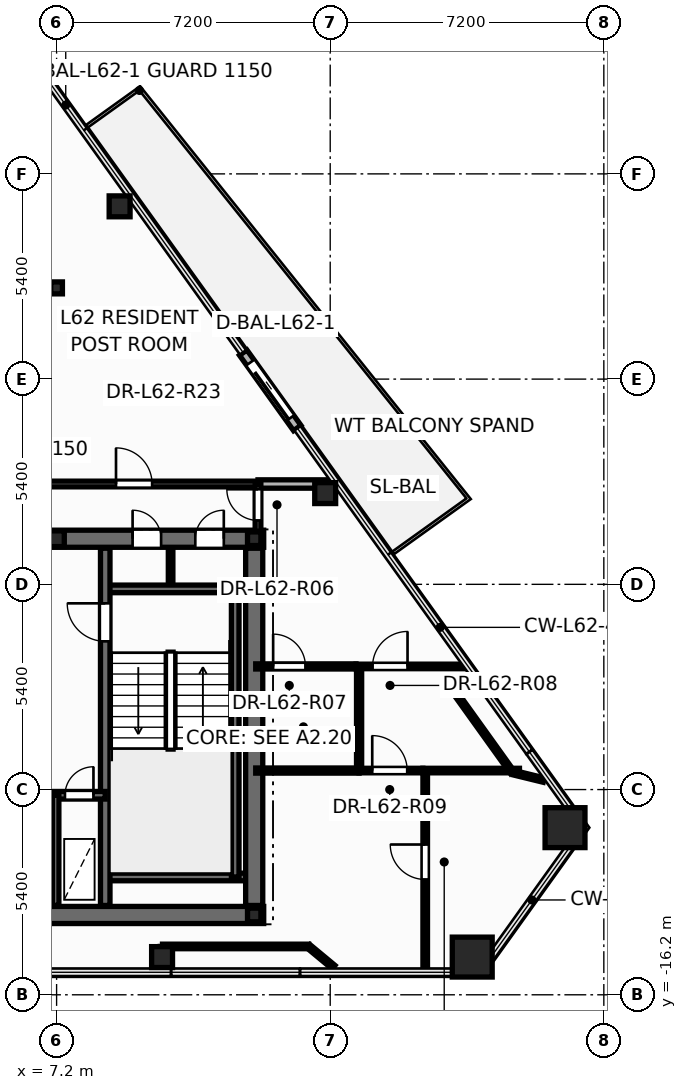
"""IFC4 building model, lengths in metres.
Left out: names, types, materials, properties, quantities, classifications, styles, units other than length and angle.
Written with IfcOpenShell. Run it as: python <this file> out.ifc"""

import sys

from ifc_helpers import new_model, si_unit, direction, frame, frame_2d, origin, origin_2d, place, context, subcontext, project, spatial, rectangle, hollow_rectangle, hollow_circle, i_section, extrude, element, fill, save


model = new_model("IFC4")
c1 = context("Model", 3, precision=1e-05, world=origin(), true_north=direction((0.0, 1.0)))
c2 = subcontext(c1, "Body", "Model", "MODEL_VIEW")
j1 = project(units=[si_unit("LENGTHUNIT", "METRE"), si_unit("PLANEANGLEUNIT", "RADIAN")], contexts=[c1])
p1 = place(None, origin())
s1 = spatial("IfcSite", under=j1, at=p1, CompositionType="ELEMENT")
p2 = place(p1, origin())
s2 = spatial("IfcBuilding", under=s1, at=p2, CompositionType="ELEMENT")
p3 = place(p2, frame((0.0, 0.0, 237.0)))
s3 = spatial("IfcBuildingStorey", under=s2, at=p3, CompositionType="ELEMENT", Elevation=237.0)
for number, where, z_axis, x_axis in (
    (1, (18.137, -15.208, 0.0), (0.0, 0.0, 1.0), (1.0, 0.0, 0.0)),
    (2, (20.579, -11.802, 0.0), (0.0, 0.0, 1.0), (1.0, 0.0, 0.0)),
):
    element("IfcColumn", number, at=place(p3, frame(where, z_axis=z_axis, x_axis=x_axis)), inside=s3, PredefinedType="COLUMN", context=c2, shape_type="SweptSolid", body=[
        extrude(hollow_rectangle(XDim=1.05, YDim=1.05, WallThickness=0.045, at=origin_2d()), origin(), (0.0, 0.0, 1.0), 3.6),
    ])
for number, where, z_axis, x_axis in (
    (3, (9.976, -15.208, 0.0), (0.0, 0.0, 1.0), (1.0, 0.0, 0.0)),
    (4, (14.268, -2.999, 0.0), (0.0, 0.0, 1.0), (1.0, 0.0, 0.0)),
    (5, (8.858, 4.546, 0.0), (0.0, 0.0, 1.0), (1.0, 0.0, 0.0)),
):
    element("IfcColumn", number, at=place(p3, frame(where, z_axis=z_axis, x_axis=x_axis)), inside=s3, PredefinedType="COLUMN", context=c2, shape_type="SweptSolid", body=[
        extrude(hollow_circle(Radius=0.275, WallThickness=0.024, at=origin_2d()), origin(), (0.0, 0.0, 1.0), 3.6),
    ])
for number, where, z_axis, x_axis in (
    (6, (12.4, -14.1, 0.0), (0.0, 0.0, 1.0), (1.0, 0.0, 0.0)),
    (7, (12.4, -4.2, 0.0), (0.0, 0.0, 1.0), (1.0, 0.0, 0.0)),
):
    element("IfcColumn", number, at=place(p3, frame(where, z_axis=z_axis, x_axis=x_axis)), inside=s3, PredefinedType="COLUMN", context=c2, shape_type="SweptSolid", body=[
        extrude(i_section(OverallWidth=0.352, OverallDepth=0.359, WebThickness=0.018, FlangeThickness=0.026, at=origin_2d()), origin(), (0.0, 0.0, 1.0), 3.6),
    ])
p4 = place(p3, frame((7.2, -4.2, 0.0), z_axis=(0.0, 0.0, 1.0), x_axis=(1.0, 0.0, 0.0)))
e8 = element("IfcColumn", 8, at=p4, inside=s3, PredefinedType="PILASTER", context=c2, shape_type="SweptSolid", body=[
    extrude(i_section(OverallWidth=0.405, OverallDepth=0.414, WebThickness=0.022, FlangeThickness=0.032, at=origin_2d()), origin(), (0.0, 0.0, 1.0), 3.6),
])
p5 = place(p3, frame((7.2, 2.4, 0.0), z_axis=(0.0, 0.0, 1.0), x_axis=(1.0, 0.0, 0.0)))
e9 = element("IfcColumn", 9, at=p5, inside=s3, PredefinedType="COLUMN", context=c2, shape_type="SweptSolid", body=[
    extrude(i_section(OverallWidth=0.307, OverallDepth=0.314, WebThickness=0.012, FlangeThickness=0.019, at=origin_2d()), origin(), (0.0, 0.0, 1.0), 3.6),
])
p6 = place(p3, frame((13.532, -1.287, -0.015), z_axis=(0.0, 0.0, 1.0), x_axis=(-0.582666574714, 0.812711303423, 0.0)))
e10 = element("IfcWall", 10, at=p6, inside=s3, PredefinedType="STANDARD", context=c2, shape_type="SweptSolid", body=[
    extrude(rectangle(XDim=2.44, YDim=0.24, at=frame_2d((1.22, 0.0))), origin(), (0.0, 0.0, 1.0), 2.878),
])
p7 = place(p6, frame((0.32, 0.0, 0.015)))
e11 = element("IfcOpeningElement", 11, at=p7, cuts=e10, PredefinedType="OPENING", context=c2, shape_type="SweptSolid", body=[
    extrude(rectangle(XDim=1.806, YDim=2.204, at=frame_2d((0.9, 1.102))), frame((0.0, 0.13, 0.0), z_axis=(0.0, -1.0, 0.0), x_axis=(1.0, 0.0, 0.0)), (0.0, 0.0, 1.0), 0.26),
])
p8 = place(p3, frame((10.2, -5.52, 0.0), z_axis=(0.0, 0.0, 1.0), x_axis=(0.0, 1.0, 0.0)))
e12 = element("IfcWall", 12, at=p8, inside=s3, PredefinedType="PARTITIONING", context=c2, shape_type="SweptSolid", body=[
    extrude(rectangle(XDim=1.12, YDim=0.12, at=frame_2d((0.56, 0.0))), origin(), (0.0, 0.0, 1.0), 3.345),
])
p9 = place(p3, frame((-12.65, -14.1, 0.0), z_axis=(0.0, 0.0, 1.0), x_axis=(1.0, 0.0, 0.0)))
e13 = element("IfcWall", 13, at=p9, inside=s3, PredefinedType="SHEAR", context=c2, shape_type="SweptSolid", body=[
    extrude(rectangle(XDim=25.3, YDim=0.45, at=frame_2d((12.65, 0.0))), origin(), (0.0, 0.0, 1.0), 3.6),
])
p10 = place(p3, frame((-12.65, -4.2, 0.0), z_axis=(0.0, 0.0, 1.0), x_axis=(1.0, 0.0, 0.0)))
e14 = element("IfcWall", 14, at=p10, inside=s3, PredefinedType="SHEAR", context=c2, shape_type="SweptSolid", body=[
    extrude(rectangle(XDim=25.3, YDim=0.45, at=frame_2d((12.65, 0.0))), origin(), (0.0, 0.0, 1.0), 3.6),
])
p11 = place(p10, frame((0.95, 0.0, 0.0)))
e15 = element("IfcOpeningElement", 15, at=p11, cuts=e14, PredefinedType="OPENING", context=c2, shape_type="SweptSolid", body=[
    extrude(rectangle(XDim=0.756, YDim=2.054, at=frame_2d((0.375, 1.027))), frame((0.0, 0.235, 0.0), z_axis=(0.0, -1.0, 0.0), x_axis=(1.0, 0.0, 0.0)), (0.0, 0.0, 1.0), 0.47),
])
p12 = place(p10, frame((2.6, 0.0, 0.0)))
e16 = element("IfcOpeningElement", 16, at=p12, cuts=e14, PredefinedType="OPENING", context=c2, shape_type="SweptSolid", body=[
    extrude(rectangle(XDim=0.756, YDim=2.054, at=frame_2d((0.375, 1.027))), frame((0.0, 0.235, 0.0), z_axis=(0.0, -1.0, 0.0), x_axis=(1.0, 0.0, 0.0)), (0.0, 0.0, 1.0), 0.47),
])
p13 = place(p10, frame((21.85, 0.0, 0.0)))
e17 = element("IfcOpeningElement", 17, at=p13, cuts=e14, PredefinedType="OPENING", context=c2, shape_type="SweptSolid", body=[
    extrude(rectangle(XDim=0.756, YDim=2.054, at=frame_2d((0.375, 1.027))), frame((0.0, 0.235, 0.0), z_axis=(0.0, -1.0, 0.0), x_axis=(1.0, 0.0, 0.0)), (0.0, 0.0, 1.0), 0.47),
])
p14 = place(p10, frame((23.5, 0.0, 0.0)))
e18 = element("IfcOpeningElement", 18, at=p14, cuts=e14, PredefinedType="OPENING", context=c2, shape_type="SweptSolid", body=[
    extrude(rectangle(XDim=0.756, YDim=2.054, at=frame_2d((0.375, 1.027))), frame((0.0, 0.235, 0.0), z_axis=(0.0, -1.0, 0.0), x_axis=(1.0, 0.0, 0.0)), (0.0, 0.0, 1.0), 0.47),
])
p15 = place(p10, frame((5.85, 0.0, 0.0)))
e19 = element("IfcOpeningElement", 19, at=p15, cuts=e14, PredefinedType="OPENING", context=c2, shape_type="SweptSolid", body=[
    extrude(rectangle(XDim=1.006, YDim=2.104, at=frame_2d((0.5, 1.052))), frame((0.0, 0.235, 0.0), z_axis=(0.0, -1.0, 0.0), x_axis=(1.0, 0.0, 0.0)), (0.0, 0.0, 1.0), 0.47),
])
p16 = place(p10, frame((10.35, 0.0, 0.0)))
e20 = element("IfcOpeningElement", 20, at=p16, cuts=e14, PredefinedType="OPENING", context=c2, shape_type="SweptSolid", body=[
    extrude(rectangle(XDim=1.406, YDim=2.154, at=frame_2d((0.7, 1.077))), frame((0.0, 0.235, 0.0), z_axis=(0.0, -1.0, 0.0), x_axis=(1.0, 0.0, 0.0)), (0.0, 0.0, 1.0), 0.47),
])
p17 = place(p10, frame((18.45, 0.0, 0.0)))
e21 = element("IfcOpeningElement", 21, at=p17, cuts=e14, PredefinedType="OPENING", context=c2, shape_type="SweptSolid", body=[
    extrude(rectangle(XDim=1.006, YDim=2.104, at=frame_2d((0.5, 1.052))), frame((0.0, 0.235, 0.0), z_axis=(0.0, -1.0, 0.0), x_axis=(1.0, 0.0, 0.0)), (0.0, 0.0, 1.0), 0.47),
])
for number, where, z_axis, x_axis in (
    (22, (8.48, -5.52, 0.0), (0.0, 0.0, 1.0), (1.0, 0.0, 0.0)),
    (23, (8.48, -13.1, 0.0), (0.0, 0.0, 1.0), (1.0, 0.0, 0.0)),
):
    element("IfcWall", number, at=place(p3, frame(where, z_axis=z_axis, x_axis=x_axis)), inside=s3, PredefinedType="SOLIDWALL", context=c2, shape_type="SweptSolid", body=[
        extrude(rectangle(XDim=3.87, YDim=0.2, at=frame_2d((1.935, 0.0))), origin(), (0.0, 0.0, 1.0), 3.6),
    ])
p18 = place(p3, frame((11.9, -13.1, 0.0), z_axis=(0.0, 0.0, 1.0), x_axis=(0.0, 1.0, 0.0)))
e24 = element("IfcWall", 24, at=p18, inside=s3, PredefinedType="SOLIDWALL", context=c2, shape_type="SweptSolid", body=[
    extrude(rectangle(XDim=7.58, YDim=0.2, at=frame_2d((3.79, 0.0))), origin(), (0.0, 0.0, 1.0), 3.6),
])
p19 = place(p3, frame((8.48, -13.85, 0.0), z_axis=(0.0, 0.0, 1.0), x_axis=(0.0, 1.0, 0.0)))
e25 = element("IfcWall", 25, at=p19, inside=s3, PredefinedType="SHEAR", context=c2, shape_type="SweptSolid", body=[
    extrude(rectangle(XDim=9.4, YDim=0.25, at=frame_2d((4.7, 0.0))), origin(), (0.0, 0.0, 1.0), 3.6),
])
p20 = place(p19, frame((6.95, 0.0, 0.0)))
e26 = element("IfcOpeningElement", 26, at=p20, cuts=e25, PredefinedType="OPENING", context=c2, shape_type="SweptSolid", body=[
    extrude(rectangle(XDim=1.006, YDim=2.104, at=frame_2d((0.5, 1.052))), frame((0.0, 0.135, 0.0), z_axis=(0.0, -1.0, 0.0), x_axis=(1.0, 0.0, 0.0)), (0.0, 0.0, 1.0), 0.27),
])
p21 = place(p3, frame((5.12, -10.95, 0.0), z_axis=(0.0, 0.0, 1.0), x_axis=(1.0, 0.0, 0.0)))
e27 = element("IfcWall", 27, at=p21, inside=s3, PredefinedType="SOLIDWALL", context=c2, shape_type="SweptSolid", body=[
    extrude(rectangle(XDim=3.36, YDim=0.2, at=frame_2d((1.68, 0.0))), origin(), (0.0, 0.0, 1.0), 3.6),
])
p22 = place(p21, frame((0.42, 0.0, 0.0)))
e28 = element("IfcOpeningElement", 28, at=p22, cuts=e27, PredefinedType="OPENING", context=c2, shape_type="SweptSolid", body=[
    extrude(rectangle(XDim=1.106, YDim=2.104, at=frame_2d((0.55, 1.052))), frame((0.0, 0.11, 0.0), z_axis=(0.0, -1.0, 0.0), x_axis=(1.0, 0.0, 0.0)), (0.0, 0.0, 1.0), 0.22),
])
p23 = place(p21, frame((2.3, 0.0, 0.0)))
e29 = element("IfcOpeningElement", 29, at=p23, cuts=e27, PredefinedType="OPENING", context=c2, shape_type="SweptSolid", body=[
    extrude(rectangle(XDim=0.756, YDim=2.054, at=frame_2d((0.375, 1.027))), frame((0.0, 0.11, 0.0), z_axis=(0.0, -1.0, 0.0), x_axis=(1.0, 0.0, 0.0)), (0.0, 0.0, 1.0), 0.22),
])
p24 = place(p3, frame((7.18, -13.85, 0.0), z_axis=(0.0, 0.0, 1.0), x_axis=(0.0, 1.0, 0.0)))
e30 = element("IfcWall", 30, at=p24, inside=s3, PredefinedType="PARTITIONING", context=c2, shape_type="SweptSolid", body=[
    extrude(rectangle(XDim=2.9, YDim=0.16, at=frame_2d((1.45, 0.0))), origin(), (0.0, 0.0, 1.0), 2.57),
])
p25 = place(p3, frame((12.4, -13.85, 0.0), z_axis=(0.0, 0.0, 1.0), x_axis=(0.0, 1.0, 0.0)))
e31 = element("IfcWall", 31, at=p25, inside=s3, PredefinedType="SHEAR", context=c2, shape_type="SweptSolid", body=[
    extrude(rectangle(XDim=9.4, YDim=0.45, at=frame_2d((4.7, 0.0))), origin(), (0.0, 0.0, 1.0), 3.6),
])
p26 = place(p3, frame((5.34, -2.76, 0.0), z_axis=(0.0, 0.0, 1.0), x_axis=(1.0, 0.0, 0.0)))
e32 = element("IfcWall", 32, at=p26, inside=s3, PredefinedType="PARTITIONING", context=c2, shape_type="SweptSolid", body=[
    extrude(rectangle(XDim=7.16, YDim=0.15, at=frame_2d((3.58, 0.0))), origin(), (0.0, 0.0, 1.0), 2.32),
])
p27 = place(p26, frame((3.423, 0.0, 0.0)))
e33 = element("IfcOpeningElement", 33, at=p27, cuts=e32, PredefinedType="OPENING", context=c2, shape_type="SweptSolid", body=[
    extrude(rectangle(XDim=0.956, YDim=2.104, at=frame_2d((0.475, 1.052))), frame((0.0, 0.085, 0.0), z_axis=(0.0, -1.0, 0.0), x_axis=(1.0, 0.0, 0.0)), (0.0, 0.0, 1.0), 0.17),
])
p28 = place(p3, frame((16.9, -15.608, 0.0), z_axis=(0.0, 0.0, 1.0), x_axis=(0.0, 1.0, 0.0)))
e34 = element("IfcWall", 34, at=p28, inside=s3, PredefinedType="PARTITIONING", context=c2, shape_type="SweptSolid", body=[
    extrude(rectangle(XDim=5.308, YDim=0.12, at=frame_2d((2.654, 0.0))), origin(), (0.0, 0.0, 1.0), 2.863),
])
p29 = place(p28, frame((2.442, 0.0, 0.0)))
e35 = element("IfcOpeningElement", 35, at=p29, cuts=e34, PredefinedType="OPENING", context=c2, shape_type="SweptSolid", body=[
    extrude(rectangle(XDim=0.926, YDim=2.104, at=frame_2d((0.46, 1.052))), frame((0.0, 0.07, 0.0), z_axis=(0.0, -1.0, 0.0), x_axis=(1.0, 0.0, 0.0)), (0.0, 0.0, 1.0), 0.14),
])
p30 = place(p3, frame((9.987, -14.928, 0.0), z_axis=(0.0, 0.0, 1.0), x_axis=(1.0, 0.0, 0.0)))
e36 = element("IfcWall", 36, at=p30, inside=s3, PredefinedType="PARTITIONING", context=c2, shape_type="SweptSolid", body=[
    extrude(rectangle(XDim=3.845, YDim=0.12, at=frame_2d((1.922, 0.0))), origin(), (0.0, 0.0, 1.0), 2.863),
])
p31 = place(p3, frame((15.08, -7.56, 0.0), z_axis=(0.0, 0.0, 1.0), x_axis=(1.0, 0.0, 0.0)))
e37 = element("IfcWall", 37, at=p31, inside=s3, PredefinedType="PARTITIONING", context=c2, shape_type="SweptSolid", body=[
    extrude(rectangle(XDim=2.95, YDim=0.12, at=frame_2d((1.475, 0.0))), origin(), (0.0, 0.0, 1.0), 2.32),
])
p32 = place(p31, frame((0.435, 0.0, 0.0)))
e38 = element("IfcOpeningElement", 38, at=p32, cuts=e37, PredefinedType="OPENING", context=c2, shape_type="SweptSolid", body=[
    extrude(rectangle(XDim=0.926, YDim=2.104, at=frame_2d((0.46, 1.052))), frame((0.0, 0.07, 0.0), z_axis=(0.0, -1.0, 0.0), x_axis=(1.0, 0.0, 0.0)), (0.0, 0.0, 1.0), 0.14),
])
p33 = place(p3, frame((12.44, -7.56, 0.0), z_axis=(0.0, 0.0, 1.0), x_axis=(1.0, 0.0, 0.0)))
e39 = element("IfcWall", 39, at=p33, inside=s3, PredefinedType="PARTITIONING", context=c2, shape_type="SweptSolid", body=[
    extrude(rectangle(XDim=2.638, YDim=0.135, at=frame_2d((1.319, 0.0))), origin(), (0.0, 0.0, 1.0), 2.863),
])
p34 = place(p33, frame((0.458, 0.0, 0.0)))
e40 = element("IfcOpeningElement", 40, at=p34, cuts=e39, PredefinedType="OPENING", context=c2, shape_type="SweptSolid", body=[
    extrude(rectangle(XDim=0.856, YDim=2.104, at=frame_2d((0.425, 1.052))), frame((0.0, 0.078, 0.0), z_axis=(0.0, -1.0, 0.0), x_axis=(1.0, 0.0, 0.0)), (0.0, 0.0, 1.0), 0.155),
])
p35 = place(p3, frame((15.16, -10.3, 0.0), z_axis=(0.0, 0.0, 1.0), x_axis=(0.0, 1.0, 0.0)))
e41 = element("IfcWall", 41, at=p35, inside=s3, PredefinedType="PARTITIONING", context=c2, shape_type="SweptSolid", body=[
    extrude(rectangle(XDim=2.74, YDim=0.135, at=frame_2d((1.37, 0.0))), origin(), (0.0, 0.0, 1.0), 3.345),
])
p36 = place(p3, frame((12.44, -10.3, 0.0), z_axis=(0.0, 0.0, 1.0), x_axis=(1.0, 0.0, 0.0)))
e42 = element("IfcWall", 42, at=p36, inside=s3, PredefinedType="PARTITIONING", context=c2, shape_type="SweptSolid", body=[
    extrude(rectangle(XDim=2.72, YDim=0.135, at=frame_2d((1.36, 0.0))), origin(), (0.0, 0.0, 1.0), 2.863),
])
p37 = place(p3, frame((16.84, -10.3, 0.0), z_axis=(0.0, 0.0, 1.0), x_axis=(1.0, 0.0, 0.0)))
e43 = element("IfcWall", 43, at=p37, inside=s3, PredefinedType="PARTITIONING", context=c2, shape_type="SweptSolid", body=[
    extrude(rectangle(XDim=2.54, YDim=0.12, at=frame_2d((1.27, 0.0))), origin(), (0.0, 0.0, 1.0), 2.32),
])
p38 = place(p3, frame((19.192, -10.348, 0.0), z_axis=(0.0, 0.0, 1.0), x_axis=(-0.582741361536, 0.812657680426, 0.0)))
e44 = element("IfcWall", 44, at=p38, inside=s3, PredefinedType="PARTITIONING", context=c2, shape_type="SweptSolid", body=[
    extrude(rectangle(XDim=2.441, YDim=0.12, at=frame_2d((1.221, 0.0))), origin(), (0.0, 0.0, 1.0), 2.32),
])
p39 = place(p3, frame((12.5, -2.76, 0.0), z_axis=(0.0, 0.0, 1.0), x_axis=(1.0, 0.0, 0.0)))
e45 = element("IfcWall", 45, at=p39, inside=s3, PredefinedType="PARTITIONING", context=c2, shape_type="SweptSolid", body=[
    extrude(rectangle(XDim=2.088, YDim=0.22, at=frame_2d((1.044, 0.0))), origin(), (0.0, 0.0, 1.0), 2.62),
])
p40 = place(p3, frame((15.16, -10.3, 0.0), z_axis=(0.0, 0.0, 1.0), x_axis=(1.0, 0.0, 0.0)))
e46 = element("IfcWall", 46, at=p40, inside=s3, PredefinedType="PARTITIONING", context=c2, shape_type="SweptSolid", body=[
    extrude(rectangle(XDim=1.678, YDim=0.12, at=frame_2d((0.839, 0.0))), origin(), (0.0, 0.0, 1.0), 3.345),
])
p41 = place(p40, frame((0.346, 0.0, 0.0)))
e47 = element("IfcOpeningElement", 47, at=p41, cuts=e46, PredefinedType="OPENING", context=c2, shape_type="SweptSolid", body=[
    extrude(rectangle(XDim=0.926, YDim=2.104, at=frame_2d((0.46, 1.052))), frame((0.0, 0.07, 0.0), z_axis=(0.0, -1.0, 0.0), x_axis=(1.0, 0.0, 0.0)), (0.0, 0.0, 1.0), 0.14),
])
p42 = place(p3, frame((12.5, -4.24, 0.0), z_axis=(0.0, 0.0, 1.0), x_axis=(0.0, 1.0, 0.0)))
e48 = element("IfcWall", 48, at=p42, inside=s3, PredefinedType="PARTITIONING", context=c2, shape_type="SweptSolid", body=[
    extrude(rectangle(XDim=1.48, YDim=0.15, at=frame_2d((0.74, 0.0))), origin(), (0.0, 0.0, 1.0), 2.32),
])
p43 = place(p42, frame((0.522, 0.0, 0.0)))
e49 = element("IfcOpeningElement", 49, at=p43, cuts=e48, PredefinedType="OPENING", context=c2, shape_type="SweptSolid", body=[
    extrude(rectangle(XDim=0.826, YDim=2.104, at=frame_2d((0.41, 1.052))), frame((0.0, 0.085, 0.0), z_axis=(0.0, -1.0, 0.0), x_axis=(1.0, 0.0, 0.0)), (0.0, 0.0, 1.0), 0.17),
])
p44 = place(p3, frame((13.832, -14.928, 0.0), z_axis=(0.0, 0.0, 1.0), x_axis=(0.769534733406, -0.638604959331, 0.0)))
e50 = element("IfcWall", 50, at=p44, inside=s3, PredefinedType="PARTITIONING", context=c2, shape_type="SweptSolid", body=[
    extrude(rectangle(XDim=0.852, YDim=0.12, at=frame_2d((0.426, 0.0))), origin(), (0.0, 0.0, 1.0), 2.863),
])
p45 = place(p3, frame((20.019, -10.55, 0.0), z_axis=(0.0, 0.0, 1.0), x_axis=(-0.971380053394, 0.237530612486, 0.0)))
e51 = element("IfcWall", 51, at=p45, inside=s3, PredefinedType="PARTITIONING", context=c2, shape_type="SweptSolid", body=[
    extrude(rectangle(XDim=0.792, YDim=0.12, at=frame_2d((0.396, 0.0))), origin(), (0.0, 0.0, 1.0), 2.32),
])
for number, where, z_axis, x_axis in (
    (52, (17.77, -8.364, 0.0), (0.0, 0.0, 1.0), (0.813, 0.583, 0.0)),
    (53, (9.987, -15.598, 0.0), (0.0, 0.0, 1.0), (0.0, 1.0, 0.0)),
):
    element("IfcWall", number, at=place(p3, frame(where, z_axis=z_axis, x_axis=x_axis)), inside=s3, PredefinedType="PARTITIONING", context=c2, shape_type="SweptSolid", body=[
        extrude(rectangle(XDim=0.67, YDim=0.12, at=frame_2d((0.335, 0.0))), origin(), (0.0, 0.0, 1.0), 2.863),
    ])
p46 = place(p7, origin())
e54 = element("IfcDoor", 54, at=p46, inside=s3, OperationType="SLIDING_TO_LEFT", PredefinedType="DOOR", context=c2, shape_type="SweptSolid", body=[
    extrude(rectangle(XDim=1.8, YDim=2.2, at=frame_2d((0.9, 1.1))), frame((0.0, 0.025, 0.0), z_axis=(0.0, -1.0, 0.0), x_axis=(1.0, 0.0, 0.0)), (0.0, 0.0, 1.0), 0.05),
])
fill(e11, e54)
p47 = place(p20, origin())
e55 = element("IfcDoor", 55, at=p47, inside=s3, OperationType="SINGLE_SWING_RIGHT", PredefinedType="DOOR", context=c2, shape_type="SweptSolid", body=[
    extrude(rectangle(XDim=1.0, YDim=2.1, at=frame_2d((0.5, 1.05))), frame((0.0, 0.025, 0.0), z_axis=(0.0, -1.0, 0.0), x_axis=(1.0, 0.0, 0.0)), (0.0, 0.0, 1.0), 0.05),
])
fill(e26, e55)
p48 = place(p23, origin())
e56 = element("IfcDoor", 56, at=p48, inside=s3, OperationType="SINGLE_SWING_RIGHT", PredefinedType="DOOR", context=c2, shape_type="SweptSolid", body=[
    extrude(rectangle(XDim=0.75, YDim=2.05, at=frame_2d((0.375, 1.025))), frame((0.0, 0.025, 0.0), z_axis=(0.0, -1.0, 0.0), x_axis=(1.0, 0.0, 0.0)), (0.0, 0.0, 1.0), 0.05),
])
fill(e29, e56)
p49 = place(p13, origin())
e57 = element("IfcDoor", 57, at=p49, inside=s3, OperationType="SINGLE_SWING_LEFT", PredefinedType="DOOR", context=c2, shape_type="SweptSolid", body=[
    extrude(rectangle(XDim=0.75, YDim=2.05, at=frame_2d((0.375, 1.025))), frame((0.0, 0.025, 0.0), z_axis=(0.0, -1.0, 0.0), x_axis=(1.0, 0.0, 0.0)), (0.0, 0.0, 1.0), 0.05),
])
fill(e17, e57)
p50 = place(p14, origin())
e58 = element("IfcDoor", 58, at=p50, inside=s3, OperationType="SINGLE_SWING_RIGHT", PredefinedType="DOOR", context=c2, shape_type="SweptSolid", body=[
    extrude(rectangle(XDim=0.75, YDim=2.05, at=frame_2d((0.375, 1.025))), frame((0.0, 0.025, 0.0), z_axis=(0.0, -1.0, 0.0), x_axis=(1.0, 0.0, 0.0)), (0.0, 0.0, 1.0), 0.05),
])
fill(e18, e58)
p51 = place(p43, origin())
e59 = element("IfcDoor", 59, at=p51, inside=s3, OperationType="SINGLE_SWING_RIGHT", PredefinedType="DOOR", context=c2, shape_type="SweptSolid", body=[
    extrude(rectangle(XDim=0.82, YDim=2.1, at=frame_2d((0.41, 1.05))), frame((0.0, 0.025, 0.0), z_axis=(0.0, -1.0, 0.0), x_axis=(1.0, 0.0, 0.0)), (0.0, 0.0, 1.0), 0.05),
])
fill(e49, e59)
p52 = place(p34, origin())
e60 = element("IfcDoor", 60, at=p52, inside=s3, OperationType="SINGLE_SWING_LEFT", PredefinedType="DOOR", context=c2, shape_type="SweptSolid", body=[
    extrude(rectangle(XDim=0.85, YDim=2.1, at=frame_2d((0.425, 1.05))), frame((0.0, 0.025, 0.0), z_axis=(0.0, -1.0, 0.0), x_axis=(1.0, 0.0, 0.0)), (0.0, 0.0, 1.0), 0.05),
])
fill(e40, e60)
p53 = place(p32, origin())
e61 = element("IfcDoor", 61, at=p53, inside=s3, OperationType="SINGLE_SWING_RIGHT", PredefinedType="DOOR", context=c2, shape_type="SweptSolid", body=[
    extrude(rectangle(XDim=0.92, YDim=2.1, at=frame_2d((0.46, 1.05))), frame((0.0, 0.025, 0.0), z_axis=(0.0, -1.0, 0.0), x_axis=(1.0, 0.0, 0.0)), (0.0, 0.0, 1.0), 0.05),
])
fill(e38, e61)
p54 = place(p41, origin())
e62 = element("IfcDoor", 62, at=p54, inside=s3, OperationType="SINGLE_SWING_LEFT", PredefinedType="DOOR", context=c2, shape_type="SweptSolid", body=[
    extrude(rectangle(XDim=0.92, YDim=2.1, at=frame_2d((0.46, 1.05))), frame((0.0, 0.025, 0.0), z_axis=(0.0, -1.0, 0.0), x_axis=(1.0, 0.0, 0.0)), (0.0, 0.0, 1.0), 0.05),
])
fill(e47, e62)
p55 = place(p29, origin())
e63 = element("IfcDoor", 63, at=p55, inside=s3, OperationType="SINGLE_SWING_RIGHT", PredefinedType="DOOR", context=c2, shape_type="SweptSolid", body=[
    extrude(rectangle(XDim=0.92, YDim=2.1, at=frame_2d((0.46, 1.05))), frame((0.0, 0.025, 0.0), z_axis=(0.0, -1.0, 0.0), x_axis=(1.0, 0.0, 0.0)), (0.0, 0.0, 1.0), 0.05),
])
fill(e35, e63)
p56 = place(p27, origin())
e64 = element("IfcDoor", 64, at=p56, inside=s3, OperationType="SINGLE_SWING_LEFT", PredefinedType="DOOR", context=c2, shape_type="SweptSolid", body=[
    extrude(rectangle(XDim=0.95, YDim=2.1, at=frame_2d((0.475, 1.05))), frame((0.0, 0.025, 0.0), z_axis=(0.0, -1.0, 0.0), x_axis=(1.0, 0.0, 0.0)), (0.0, 0.0, 1.0), 0.05),
])
fill(e33, e64)
save(model, sys.argv[1])
